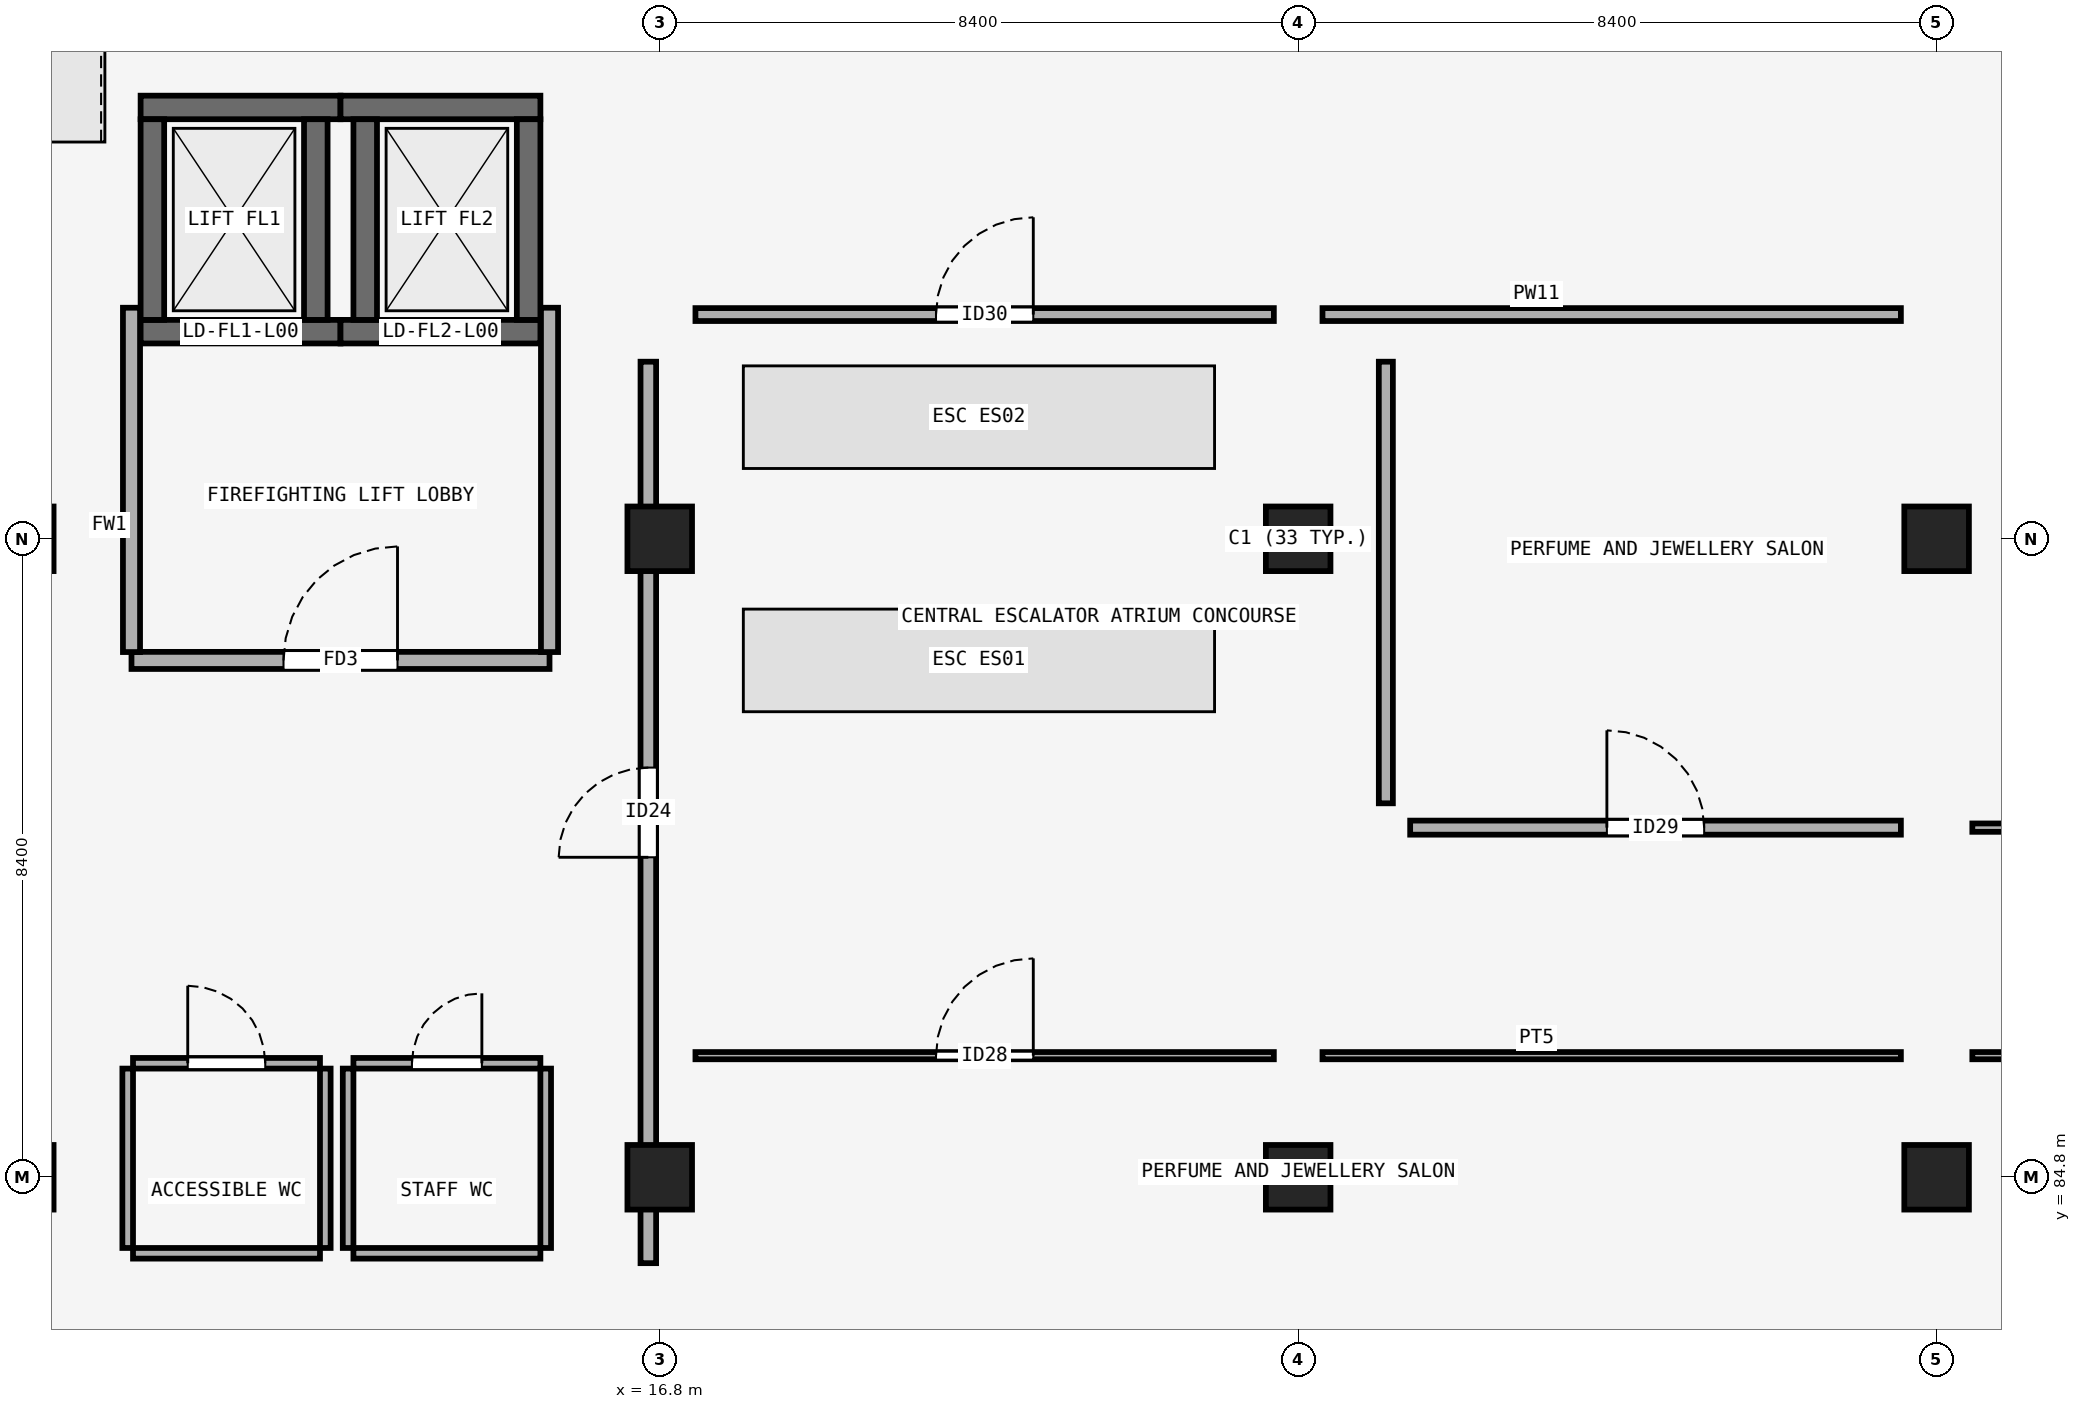
"""IFC4 building model, lengths in metres.
Left out: names, types, materials, properties, quantities, classifications, styles, units other than length and angle.
Written with IfcOpenShell. Run it as: python <this file> out.ifc"""

import sys

from ifc_helpers import new_model, si_unit, direction, frame, frame_2d, origin, origin_2d, place, context, subcontext, project, spatial, rectangle, extrude, element, fill, save


model = new_model("IFC4")
c1 = context("Model", 3, precision=1e-05, world=origin(), true_north=direction((0.0, 1.0)))
c2 = subcontext(c1, "Body", "Model", "MODEL_VIEW")
j1 = project(units=[si_unit("LENGTHUNIT", "METRE"), si_unit("PLANEANGLEUNIT", "RADIAN")], contexts=[c1])
p1 = place(None, origin())
s1 = spatial("IfcSite", under=j1, at=p1, CompositionType="ELEMENT")
p2 = place(p1, origin())
s2 = spatial("IfcBuilding", under=s1, at=p2, CompositionType="ELEMENT")
p3 = place(p2, origin())
s3 = spatial("IfcBuildingStorey", under=s2, at=p3, CompositionType="ELEMENT", Elevation=0.0)
for number, where, z_axis, x_axis in (
    (1, (8.4, 84.8, 0.0), (0.0, 0.0, 1.0), (1.0, 0.0, 0.0)),
    (2, (16.8, 84.8, 0.0), (0.0, 0.0, 1.0), (1.0, 0.0, 0.0)),
    (3, (25.2, 84.8, 0.0), (0.0, 0.0, 1.0), (1.0, 0.0, 0.0)),
    (4, (33.6, 84.8, 0.0), (0.0, 0.0, 1.0), (1.0, 0.0, 0.0)),
    (5, (8.4, 93.2, 0.0), (0.0, 0.0, 1.0), (1.0, 0.0, 0.0)),
    (6, (16.8, 93.2, 0.0), (0.0, 0.0, 1.0), (1.0, 0.0, 0.0)),
    (7, (25.2, 93.2, 0.0), (0.0, 0.0, 1.0), (1.0, 0.0, 0.0)),
    (8, (33.6, 93.2, 0.0), (0.0, 0.0, 1.0), (1.0, 0.0, 0.0)),
):
    element("IfcColumn", number, at=place(p3, frame(where, z_axis=z_axis, x_axis=x_axis)), inside=s3, PredefinedType="COLUMN", context=c2, shape_type="SweptSolid", body=[
        extrude(rectangle(XDim=0.85, YDim=0.85, at=origin_2d()), origin(), (0.0, 0.0, 1.0), 5.4),
    ])
p4 = place(p3, frame((9.97, 95.925, 0.0), z_axis=(0.0, 0.0, 1.0), x_axis=(1.0, 0.0, 0.0)))
e9 = element("IfcWall", 9, at=p4, inside=s3, PredefinedType="SHEAR", context=c2, shape_type="SweptSolid", body=[
    extrude(rectangle(XDim=2.63, YDim=0.31, at=frame_2d((1.315, 0.0))), origin(), (0.0, 0.0, 1.0), 5.1),
])
p5 = place(p4, frame((0.715, 0.0, 0.0)))
e10 = element("IfcOpeningElement", 10, at=p5, cuts=e9, PredefinedType="OPENING", context=c2, shape_type="SweptSolid", body=[
    extrude(rectangle(XDim=1.2, YDim=2.25, at=frame_2d((0.6, 1.125))), frame((0.0, 0.165, 0.0), z_axis=(0.0, -1.0, 0.0), x_axis=(1.0, 0.0, 0.0)), (0.0, 0.0, 1.0), 0.33),
])
p6 = place(p3, frame((9.97, 98.875, 0.0), z_axis=(0.0, 0.0, 1.0), x_axis=(1.0, 0.0, 0.0)))
e11 = element("IfcWall", 11, at=p6, inside=s3, PredefinedType="SHEAR", context=c2, shape_type="SweptSolid", body=[
    extrude(rectangle(XDim=2.63, YDim=0.31, at=frame_2d((1.315, 0.0))), origin(), (0.0, 0.0, 1.0), 5.1),
])
for number, where, z_axis, x_axis in (
    (12, (10.125, 96.08, 0.0), (0.0, 0.0, 1.0), (0.0, 1.0, 0.0)),
    (13, (12.275, 96.08, 0.0), (0.0, 0.0, 1.0), (0.0, 1.0, 0.0)),
):
    element("IfcWall", number, at=place(p3, frame(where, z_axis=z_axis, x_axis=x_axis)), inside=s3, PredefinedType="SHEAR", context=c2, shape_type="SweptSolid", body=[
        extrude(rectangle(XDim=2.64, YDim=0.31, at=frame_2d((1.32, 0.0))), origin(), (0.0, 0.0, 1.0), 5.1),
    ])
p7 = place(p3, frame((12.6, 95.925, 0.0), z_axis=(0.0, 0.0, 1.0), x_axis=(1.0, 0.0, 0.0)))
e14 = element("IfcWall", 14, at=p7, inside=s3, PredefinedType="SHEAR", context=c2, shape_type="SweptSolid", body=[
    extrude(rectangle(XDim=2.63, YDim=0.31, at=frame_2d((1.315, 0.0))), origin(), (0.0, 0.0, 1.0), 5.1),
])
p8 = place(p7, frame((0.715, 0.0, 0.0)))
e15 = element("IfcOpeningElement", 15, at=p8, cuts=e14, PredefinedType="OPENING", context=c2, shape_type="SweptSolid", body=[
    extrude(rectangle(XDim=1.2, YDim=2.25, at=frame_2d((0.6, 1.125))), frame((0.0, 0.165, 0.0), z_axis=(0.0, -1.0, 0.0), x_axis=(1.0, 0.0, 0.0)), (0.0, 0.0, 1.0), 0.33),
])
p9 = place(p3, frame((12.6, 98.875, 0.0), z_axis=(0.0, 0.0, 1.0), x_axis=(1.0, 0.0, 0.0)))
e16 = element("IfcWall", 16, at=p9, inside=s3, PredefinedType="SHEAR", context=c2, shape_type="SweptSolid", body=[
    extrude(rectangle(XDim=2.63, YDim=0.31, at=frame_2d((1.315, 0.0))), origin(), (0.0, 0.0, 1.0), 5.1),
])
for number, where, z_axis, x_axis in (
    (17, (12.925, 96.08, 0.0), (0.0, 0.0, 1.0), (0.0, 1.0, 0.0)),
    (18, (15.075, 96.08, 0.0), (0.0, 0.0, 1.0), (0.0, 1.0, 0.0)),
):
    element("IfcWall", number, at=place(p3, frame(where, z_axis=z_axis, x_axis=x_axis)), inside=s3, PredefinedType="SHEAR", context=c2, shape_type="SweptSolid", body=[
        extrude(rectangle(XDim=2.64, YDim=0.31, at=frame_2d((1.32, 0.0))), origin(), (0.0, 0.0, 1.0), 5.1),
    ])
p10 = place(p3, frame((9.85, 91.6, 0.0), z_axis=(0.0, 0.0, 1.0), x_axis=(1.0, 0.0, 0.0)))
e19 = element("IfcWall", 19, at=p10, inside=s3, PredefinedType="PARTITIONING", context=c2, shape_type="SweptSolid", body=[
    extrude(rectangle(XDim=5.5, YDim=0.225, at=frame_2d((2.75, 0.0))), origin(), (0.0, 0.0, 1.0), 5.1),
])
p11 = place(p10, frame((2.0, 0.0, 0.0)))
e20 = element("IfcOpeningElement", 20, at=p11, cuts=e19, PredefinedType="OPENING", context=c2, shape_type="SweptSolid", body=[
    extrude(rectangle(XDim=1.5, YDim=2.25, at=frame_2d((0.75, 1.125))), frame((0.0, 0.123, 0.0), z_axis=(0.0, -1.0, 0.0), x_axis=(1.0, 0.0, 0.0)), (0.0, 0.0, 1.0), 0.245),
])
for number, where, z_axis, x_axis in (
    (21, (9.85, 91.71, 0.0), (0.0, 0.0, 1.0), (0.0, 1.0, 0.0)),
    (22, (15.35, 91.71, 0.0), (0.0, 0.0, 1.0), (0.0, 1.0, 0.0)),
):
    element("IfcWall", number, at=place(p3, frame(where, z_axis=z_axis, x_axis=x_axis)), inside=s3, PredefinedType="PARTITIONING", context=c2, shape_type="SweptSolid", body=[
        extrude(rectangle(XDim=4.53, YDim=0.225, at=frame_2d((2.265, 0.0))), origin(), (0.0, 0.0, 1.0), 4.4),
    ])
p12 = place(p3, frame((9.87, 86.3, 0.0), z_axis=(0.0, 0.0, 1.0), x_axis=(1.0, 0.0, 0.0)))
e23 = element("IfcWall", 23, at=p12, inside=s3, PredefinedType="PARTITIONING", context=c2, shape_type="SweptSolid", body=[
    extrude(rectangle(XDim=2.46, YDim=0.14, at=frame_2d((1.23, 0.0))), origin(), (0.0, 0.0, 1.0), 5.1),
])
p13 = place(p12, frame((0.72, 0.0, 0.0)))
e24 = element("IfcOpeningElement", 24, at=p13, cuts=e23, PredefinedType="OPENING", context=c2, shape_type="SweptSolid", body=[
    extrude(rectangle(XDim=1.02, YDim=2.15, at=frame_2d((0.51, 1.075))), frame((0.0, 0.08, 0.0), z_axis=(0.0, -1.0, 0.0), x_axis=(1.0, 0.0, 0.0)), (0.0, 0.0, 1.0), 0.16),
])
p14 = place(p3, frame((9.87, 83.8, 0.0), z_axis=(0.0, 0.0, 1.0), x_axis=(1.0, 0.0, 0.0)))
e25 = element("IfcWall", 25, at=p14, inside=s3, PredefinedType="PARTITIONING", context=c2, shape_type="SweptSolid", body=[
    extrude(rectangle(XDim=2.46, YDim=0.14, at=frame_2d((1.23, 0.0))), origin(), (0.0, 0.0, 1.0), 5.1),
])
for number, where, z_axis, x_axis in (
    (26, (9.8, 83.87, 0.0), (0.0, 0.0, 1.0), (0.0, 1.0, 0.0)),
    (27, (12.4, 83.87, 0.0), (0.0, 0.0, 1.0), (0.0, 1.0, 0.0)),
):
    element("IfcWall", number, at=place(p3, frame(where, z_axis=z_axis, x_axis=x_axis)), inside=s3, PredefinedType="PARTITIONING", context=c2, shape_type="SweptSolid", body=[
        extrude(rectangle(XDim=2.36, YDim=0.14, at=frame_2d((1.18, 0.0))), origin(), (0.0, 0.0, 1.0), 4.35),
    ])
p15 = place(p3, frame((12.77, 86.3, 0.0), z_axis=(0.0, 0.0, 1.0), x_axis=(1.0, 0.0, 0.0)))
e28 = element("IfcWall", 28, at=p15, inside=s3, PredefinedType="PARTITIONING", context=c2, shape_type="SweptSolid", body=[
    extrude(rectangle(XDim=2.46, YDim=0.14, at=frame_2d((1.23, 0.0))), origin(), (0.0, 0.0, 1.0), 5.1),
])
p16 = place(p15, frame((0.77, 0.0, 0.0)))
e29 = element("IfcOpeningElement", 29, at=p16, cuts=e28, PredefinedType="OPENING", context=c2, shape_type="SweptSolid", body=[
    extrude(rectangle(XDim=0.92, YDim=2.12, at=frame_2d((0.46, 1.06))), frame((0.0, 0.08, 0.0), z_axis=(0.0, -1.0, 0.0), x_axis=(1.0, 0.0, 0.0)), (0.0, 0.0, 1.0), 0.16),
])
p17 = place(p3, frame((12.77, 83.8, 0.0), z_axis=(0.0, 0.0, 1.0), x_axis=(1.0, 0.0, 0.0)))
e30 = element("IfcWall", 30, at=p17, inside=s3, PredefinedType="PARTITIONING", context=c2, shape_type="SweptSolid", body=[
    extrude(rectangle(XDim=2.46, YDim=0.14, at=frame_2d((1.23, 0.0))), origin(), (0.0, 0.0, 1.0), 5.1),
])
for number, where, z_axis, x_axis in (
    (31, (12.7, 83.87, 0.0), (0.0, 0.0, 1.0), (0.0, 1.0, 0.0)),
    (32, (15.3, 83.87, 0.0), (0.0, 0.0, 1.0), (0.0, 1.0, 0.0)),
):
    element("IfcWall", number, at=place(p3, frame(where, z_axis=z_axis, x_axis=x_axis)), inside=s3, PredefinedType="PARTITIONING", context=c2, shape_type="SweptSolid", body=[
        extrude(rectangle(XDim=2.36, YDim=0.14, at=frame_2d((1.18, 0.0))), origin(), (0.0, 0.0, 1.0), 4.35),
    ])
p18 = place(p3, frame((16.65, 83.67, 0.0), z_axis=(0.0, 0.0, 1.0), x_axis=(0.0, 1.0, 0.0)))
e33 = element("IfcWall", 33, at=p18, inside=s3, PredefinedType="PARTITIONING", context=c2, shape_type="SweptSolid", body=[
    extrude(rectangle(XDim=11.86, YDim=0.205, at=frame_2d((5.93, 0.0))), origin(), (0.0, 0.0, 1.0), 4.35),
])
p19 = place(p18, frame((5.34, 0.0, 0.0)))
e34 = element("IfcOpeningElement", 34, at=p19, cuts=e33, PredefinedType="OPENING", context=c2, shape_type="SweptSolid", body=[
    extrude(rectangle(XDim=1.18, YDim=2.22, at=frame_2d((0.59, 1.11))), frame((0.0, 0.113, 0.0), z_axis=(0.0, -1.0, 0.0), x_axis=(1.0, 0.0, 0.0)), (0.0, 0.0, 1.0), 0.225),
])
p20 = place(p3, frame((17.27, 86.4, 0.0), z_axis=(0.0, 0.0, 1.0), x_axis=(1.0, 0.0, 0.0)))
e35 = element("IfcWall", 35, at=p20, inside=s3, PredefinedType="PARTITIONING", context=c2, shape_type="SweptSolid", body=[
    extrude(rectangle(XDim=7.61, YDim=0.095, at=frame_2d((3.805, 0.0))), origin(), (0.0, 0.0, 1.0), 5.1),
])
p21 = place(p20, frame((3.165, 0.0, 0.0)))
e36 = element("IfcOpeningElement", 36, at=p21, cuts=e35, PredefinedType="OPENING", context=c2, shape_type="SweptSolid", body=[
    extrude(rectangle(XDim=1.28, YDim=2.22, at=frame_2d((0.64, 1.11))), frame((0.0, 0.057, 0.0), z_axis=(0.0, -1.0, 0.0), x_axis=(1.0, 0.0, 0.0)), (0.0, 0.0, 1.0), 0.115),
])
p22 = place(p3, frame((25.52, 86.4, 0.0), z_axis=(0.0, 0.0, 1.0), x_axis=(1.0, 0.0, 0.0)))
e37 = element("IfcWall", 37, at=p22, inside=s3, PredefinedType="PARTITIONING", context=c2, shape_type="SweptSolid", body=[
    extrude(rectangle(XDim=7.61, YDim=0.095, at=frame_2d((3.805, 0.0))), origin(), (0.0, 0.0, 1.0), 5.1),
])
p23 = place(p3, frame((26.674, 89.4, 0.0), z_axis=(0.0, 0.0, 1.0), x_axis=(1.0, 0.0, 0.0)))
e38 = element("IfcWall", 38, at=p23, inside=s3, PredefinedType="PARTITIONING", context=c2, shape_type="SweptSolid", body=[
    extrude(rectangle(XDim=6.456, YDim=0.185, at=frame_2d((3.228, 0.0))), origin(), (0.0, 0.0, 1.0), 5.1),
])
p24 = place(p23, frame((2.588, 0.0, 0.0)))
e39 = element("IfcOpeningElement", 39, at=p24, cuts=e38, PredefinedType="OPENING", context=c2, shape_type="SweptSolid", body=[
    extrude(rectangle(XDim=1.28, YDim=2.34, at=frame_2d((0.64, 1.17))), frame((0.0, 0.103, 0.0), z_axis=(0.0, -1.0, 0.0), x_axis=(1.0, 0.0, 0.0)), (0.0, 0.0, 1.0), 0.205),
])
p25 = place(p3, frame((26.354, 89.72, 0.0), z_axis=(0.0, 0.0, 1.0), x_axis=(0.0, 1.0, 0.0)))
e40 = element("IfcWall", 40, at=p25, inside=s3, PredefinedType="PARTITIONING", context=c2, shape_type="SweptSolid", body=[
    extrude(rectangle(XDim=5.81, YDim=0.185, at=frame_2d((2.905, 0.0))), origin(), (0.0, 0.0, 1.0), 4.4),
])
p26 = place(p3, frame((17.27, 96.15, 0.0), z_axis=(0.0, 0.0, 1.0), x_axis=(1.0, 0.0, 0.0)))
e41 = element("IfcWall", 41, at=p26, inside=s3, PredefinedType="PARTITIONING", context=c2, shape_type="SweptSolid", body=[
    extrude(rectangle(XDim=7.61, YDim=0.17, at=frame_2d((3.805, 0.0))), origin(), (0.0, 0.0, 1.0), 5.1),
])
p27 = place(p26, frame((3.165, 0.0, 0.0)))
e42 = element("IfcOpeningElement", 42, at=p27, cuts=e41, PredefinedType="OPENING", context=c2, shape_type="SweptSolid", body=[
    extrude(rectangle(XDim=1.28, YDim=2.46, at=frame_2d((0.64, 1.23))), frame((0.0, 0.095, 0.0), z_axis=(0.0, -1.0, 0.0), x_axis=(1.0, 0.0, 0.0)), (0.0, 0.0, 1.0), 0.19),
])
p28 = place(p3, frame((25.52, 96.15, 0.0), z_axis=(0.0, 0.0, 1.0), x_axis=(1.0, 0.0, 0.0)))
e43 = element("IfcWall", 43, at=p28, inside=s3, PredefinedType="PARTITIONING", context=c2, shape_type="SweptSolid", body=[
    extrude(rectangle(XDim=7.61, YDim=0.17, at=frame_2d((3.805, 0.0))), origin(), (0.0, 0.0, 1.0), 5.1),
])
p29 = place(p3, frame((34.07, 89.4, 0.0), z_axis=(0.0, 0.0, 1.0), x_axis=(1.0, 0.0, 0.0)))
e44 = element("IfcWall", 44, at=p29, inside=s3, PredefinedType="PARTITIONING", context=c2, shape_type="SweptSolid", body=[
    extrude(rectangle(XDim=7.61, YDim=0.11, at=frame_2d((3.805, 0.0))), origin(), (0.0, 0.0, 1.0), 5.1),
])
p30 = place(p29, frame((3.125, 0.0, 0.0)))
e45 = element("IfcOpeningElement", 45, at=p30, cuts=e44, PredefinedType="OPENING", context=c2, shape_type="SweptSolid", body=[
    extrude(rectangle(XDim=1.36, YDim=2.46, at=frame_2d((0.68, 1.23))), frame((0.0, 0.065, 0.0), z_axis=(0.0, -1.0, 0.0), x_axis=(1.0, 0.0, 0.0)), (0.0, 0.0, 1.0), 0.13),
])
p31 = place(p3, frame((34.07, 86.4, 0.0), z_axis=(0.0, 0.0, 1.0), x_axis=(1.0, 0.0, 0.0)))
e46 = element("IfcWall", 46, at=p31, inside=s3, PredefinedType="PARTITIONING", context=c2, shape_type="SweptSolid", body=[
    extrude(rectangle(XDim=7.61, YDim=0.095, at=frame_2d((3.805, 0.0))), origin(), (0.0, 0.0, 1.0), 5.1),
])
p32 = place(p31, frame((3.085, 0.0, 0.0)))
e47 = element("IfcOpeningElement", 47, at=p32, cuts=e46, PredefinedType="OPENING", context=c2, shape_type="SweptSolid", body=[
    extrude(rectangle(XDim=1.44, YDim=2.1, at=frame_2d((0.72, 1.05))), frame((0.0, 0.057, 0.0), z_axis=(0.0, -1.0, 0.0), x_axis=(1.0, 0.0, 0.0)), (0.0, 0.0, 1.0), 0.115),
])
p33 = place(p5, origin())
e48 = element("IfcDoor", 48, at=p33, inside=s3, OperationType="SLIDING_TO_LEFT", PredefinedType="DOOR", context=c2, shape_type="SweptSolid", body=[
    extrude(rectangle(XDim=1.2, YDim=2.25, at=frame_2d((0.6, 1.125))), frame((0.0, 0.025, 0.0), z_axis=(0.0, -1.0, 0.0), x_axis=(1.0, 0.0, 0.0)), (0.0, 0.0, 1.0), 0.05),
])
fill(e10, e48)
p34 = place(p8, origin())
e49 = element("IfcDoor", 49, at=p34, inside=s3, OperationType="SLIDING_TO_LEFT", PredefinedType="DOOR", context=c2, shape_type="SweptSolid", body=[
    extrude(rectangle(XDim=1.2, YDim=2.25, at=frame_2d((0.6, 1.125))), frame((0.0, 0.025, 0.0), z_axis=(0.0, -1.0, 0.0), x_axis=(1.0, 0.0, 0.0)), (0.0, 0.0, 1.0), 0.05),
])
fill(e15, e49)
p35 = place(p11, origin())
e50 = element("IfcDoor", 50, at=p35, inside=s3, OperationType="SINGLE_SWING_RIGHT", PredefinedType="DOOR", context=c2, shape_type="SweptSolid", body=[
    extrude(rectangle(XDim=1.5, YDim=2.25, at=frame_2d((0.75, 1.125))), frame((0.0, 0.025, 0.0), z_axis=(0.0, -1.0, 0.0), x_axis=(1.0, 0.0, 0.0)), (0.0, 0.0, 1.0), 0.05),
])
fill(e20, e50)
p36 = place(p13, origin())
e51 = element("IfcDoor", 51, at=p36, inside=s3, OperationType="SINGLE_SWING_LEFT", PredefinedType="DOOR", context=c2, shape_type="SweptSolid", body=[
    extrude(rectangle(XDim=1.02, YDim=2.15, at=frame_2d((0.51, 1.075))), frame((0.0, 0.025, 0.0), z_axis=(0.0, -1.0, 0.0), x_axis=(1.0, 0.0, 0.0)), (0.0, 0.0, 1.0), 0.05),
])
fill(e24, e51)
p37 = place(p16, origin())
e52 = element("IfcDoor", 52, at=p37, inside=s3, OperationType="SINGLE_SWING_RIGHT", PredefinedType="DOOR", context=c2, shape_type="SweptSolid", body=[
    extrude(rectangle(XDim=0.92, YDim=2.12, at=frame_2d((0.46, 1.06))), frame((0.0, 0.025, 0.0), z_axis=(0.0, -1.0, 0.0), x_axis=(1.0, 0.0, 0.0)), (0.0, 0.0, 1.0), 0.05),
])
fill(e29, e52)
p38 = place(p19, origin())
e53 = element("IfcDoor", 53, at=p38, inside=s3, OperationType="SINGLE_SWING_LEFT", PredefinedType="DOOR", context=c2, shape_type="SweptSolid", body=[
    extrude(rectangle(XDim=1.18, YDim=2.22, at=frame_2d((0.59, 1.11))), frame((0.0, 0.025, 0.0), z_axis=(0.0, -1.0, 0.0), x_axis=(1.0, 0.0, 0.0)), (0.0, 0.0, 1.0), 0.05),
])
fill(e34, e53)
p39 = place(p21, origin())
e54 = element("IfcDoor", 54, at=p39, inside=s3, OperationType="SINGLE_SWING_RIGHT", PredefinedType="DOOR", context=c2, shape_type="SweptSolid", body=[
    extrude(rectangle(XDim=1.28, YDim=2.22, at=frame_2d((0.64, 1.11))), frame((0.0, 0.025, 0.0), z_axis=(0.0, -1.0, 0.0), x_axis=(1.0, 0.0, 0.0)), (0.0, 0.0, 1.0), 0.05),
])
fill(e36, e54)
p40 = place(p24, origin())
e55 = element("IfcDoor", 55, at=p40, inside=s3, OperationType="SINGLE_SWING_LEFT", PredefinedType="DOOR", context=c2, shape_type="SweptSolid", body=[
    extrude(rectangle(XDim=1.28, YDim=2.34, at=frame_2d((0.64, 1.17))), frame((0.0, 0.025, 0.0), z_axis=(0.0, -1.0, 0.0), x_axis=(1.0, 0.0, 0.0)), (0.0, 0.0, 1.0), 0.05),
])
fill(e39, e55)
p41 = place(p27, origin())
e56 = element("IfcDoor", 56, at=p41, inside=s3, OperationType="SINGLE_SWING_RIGHT", PredefinedType="DOOR", context=c2, shape_type="SweptSolid", body=[
    extrude(rectangle(XDim=1.28, YDim=2.46, at=frame_2d((0.64, 1.23))), frame((0.0, 0.025, 0.0), z_axis=(0.0, -1.0, 0.0), x_axis=(1.0, 0.0, 0.0)), (0.0, 0.0, 1.0), 0.05),
])
fill(e42, e56)
save(model, sys.argv[1])
